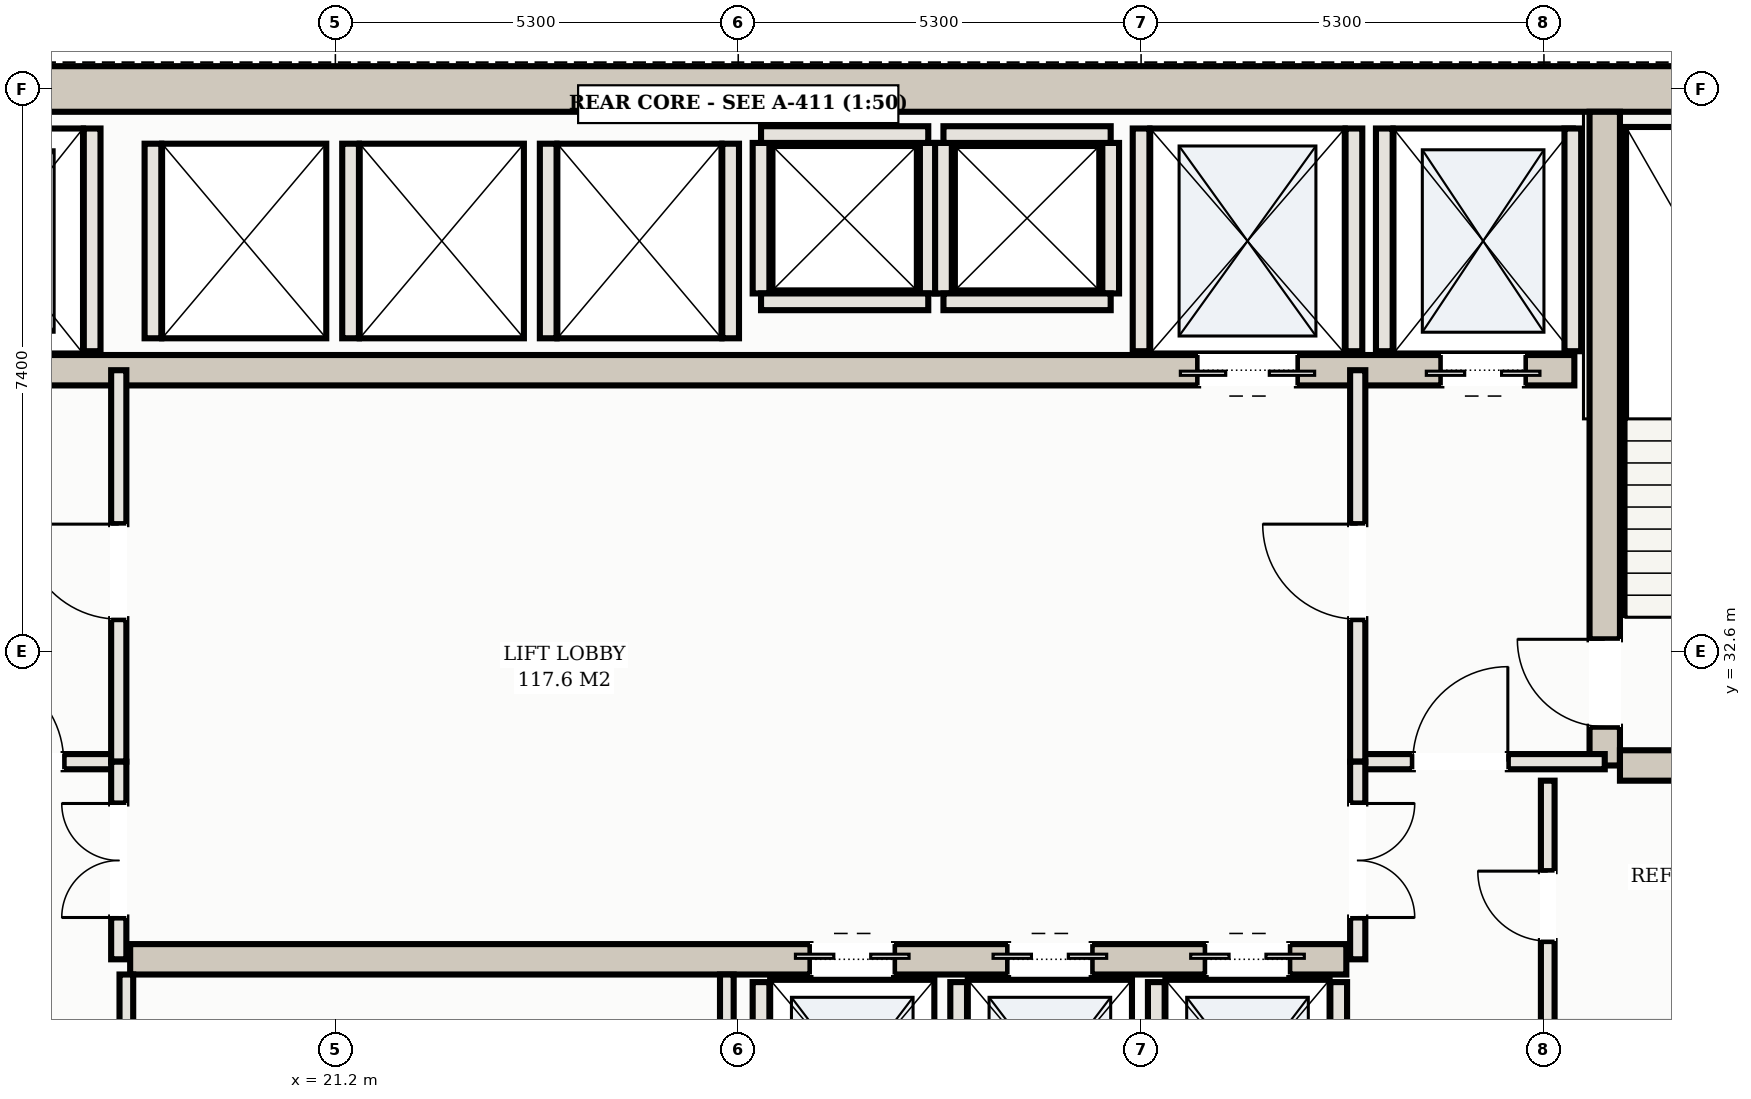
"""IFC4 building model, lengths in metres.
Left out: names, types, materials, properties, quantities, classifications, styles, units other than length and angle.
Written with IfcOpenShell. Run it as: python <this file> out.ifc"""

import sys

from ifc_helpers import new_model, si_unit, direction, frame, frame_2d, origin, place, context, subcontext, project, spatial, rectangle, extrude, element, fill, save


model = new_model("IFC4")
c1 = context("Model", 3, precision=1e-05, world=origin(), true_north=direction((0.0, 1.0)))
c2 = subcontext(c1, "Body", "Model", "MODEL_VIEW")
j1 = project(units=[si_unit("LENGTHUNIT", "METRE"), si_unit("PLANEANGLEUNIT", "RADIAN")], contexts=[c1])
p1 = place(None, origin())
s1 = spatial("IfcSite", under=j1, at=p1, CompositionType="ELEMENT")
p2 = place(p1, origin())
s2 = spatial("IfcBuilding", under=s1, at=p2, CompositionType="ELEMENT")
p3 = place(p2, frame((0.0, 0.0, 178.8)))
s3 = spatial("IfcBuildingStorey", under=s2, at=p3, CompositionType="ELEMENT", Elevation=178.8)
p4 = place(p3, frame((10.3, 40.0, 0.0), z_axis=(0.0, 0.0, 1.0), x_axis=(1.0, 0.0, 0.0)))
e1 = element("IfcWall", 1, at=p4, inside=s3, PredefinedType="SHEAR", context=c2, shape_type="SweptSolid", body=[
    extrude(rectangle(XDim=32.4, YDim=0.6, at=frame_2d((16.2, 0.0))), origin(), (0.0, 0.0, 1.0), 3.1),
])
p5 = place(p3, frame((37.9, 31.1, 0.0), z_axis=(0.0, 0.0, 1.0), x_axis=(0.0, 1.0, 0.0)))
e2 = element("IfcWall", 2, at=p5, inside=s3, PredefinedType="SHEAR", context=c2, shape_type="SweptSolid", body=[
    extrude(rectangle(XDim=8.6, YDim=0.4, at=frame_2d((4.3, 0.0))), origin(), (0.0, 0.0, 1.0), 3.1),
])
p6 = place(p5, frame((0.51, 0.0, 0.0)))
e3 = element("IfcOpeningElement", 3, at=p6, cuts=e2, PredefinedType="OPENING", context=c2, shape_type="SweptSolid", body=[
    extrude(rectangle(XDim=1.15, YDim=2.2, at=frame_2d((0.575, 1.1))), frame((0.0, 0.21, 0.0), z_axis=(0.0, -1.0, 0.0), x_axis=(1.0, 0.0, 0.0)), (0.0, 0.0, 1.0), 0.42),
])
p7 = place(p3, frame((38.1, 31.1, 0.0), z_axis=(0.0, 0.0, 1.0), x_axis=(1.0, 0.0, 0.0)))
e4 = element("IfcWall", 4, at=p7, inside=s3, PredefinedType="SHEAR", context=c2, shape_type="SweptSolid", body=[
    extrude(rectangle(XDim=4.0, YDim=0.4, at=frame_2d((2.0, 0.0))), origin(), (0.0, 0.0, 1.0), 3.1),
])
p8 = place(p3, frame((15.5, 36.3, 0.0), z_axis=(0.0, 0.0, 1.0), x_axis=(1.0, 0.0, 0.0)))
e5 = element("IfcWall", 5, at=p8, inside=s3, PredefinedType="SHEAR", context=c2, shape_type="SweptSolid", body=[
    extrude(rectangle(XDim=22.0, YDim=0.4, at=frame_2d((11.0, 0.0))), origin(), (0.0, 0.0, 1.0), 3.1),
])
p9 = place(p8, frame((0.65, 0.0, 0.0)))
e6 = element("IfcOpeningElement", 6, at=p9, cuts=e5, PredefinedType="OPENING", context=c2, shape_type="SweptSolid", body=[
    extrude(rectangle(XDim=1.1, YDim=2.15, at=frame_2d((0.55, 1.075))), frame((0.0, 0.21, 0.0), z_axis=(0.0, -1.0, 0.0), x_axis=(1.0, 0.0, 0.0)), (0.0, 0.0, 1.0), 0.42),
])
p10 = place(p8, frame((20.25, 0.0, 0.0)))
e7 = element("IfcOpeningElement", 7, at=p10, cuts=e5, PredefinedType="OPENING", context=c2, shape_type="SweptSolid", body=[
    extrude(rectangle(XDim=1.1, YDim=2.15, at=frame_2d((0.55, 1.075))), frame((0.0, 0.21, 0.0), z_axis=(0.0, -1.0, 0.0), x_axis=(1.0, 0.0, 0.0)), (0.0, 0.0, 1.0), 0.42),
])
p11 = place(p8, frame((17.05, 0.0, 0.0)))
e8 = element("IfcOpeningElement", 8, at=p11, cuts=e5, PredefinedType="OPENING", context=c2, shape_type="SweptSolid", body=[
    extrude(rectangle(XDim=1.3, YDim=2.2, at=frame_2d((0.65, 1.1))), frame((0.0, 0.21, 0.0), z_axis=(0.0, -1.0, 0.0), x_axis=(1.0, 0.0, 0.0)), (0.0, 0.0, 1.0), 0.42),
])
p12 = place(p3, frame((18.5, 28.55, 0.0), z_axis=(0.0, 0.0, 1.0), x_axis=(1.0, 0.0, 0.0)))
e9 = element("IfcWall", 9, at=p12, inside=s3, PredefinedType="SHEAR", context=c2, shape_type="SweptSolid", body=[
    extrude(rectangle(XDim=16.0, YDim=0.4, at=frame_2d((8.0, 0.0))), origin(), (0.0, 0.0, 1.0), 3.1),
])
p13 = place(p12, frame((8.95, 0.0, 0.0)))
e10 = element("IfcOpeningElement", 10, at=p13, cuts=e9, PredefinedType="OPENING", context=c2, shape_type="SweptSolid", body=[
    extrude(rectangle(XDim=1.1, YDim=2.15, at=frame_2d((0.55, 1.075))), frame((0.0, 0.21, 0.0), z_axis=(0.0, -1.0, 0.0), x_axis=(1.0, 0.0, 0.0)), (0.0, 0.0, 1.0), 0.42),
])
p14 = place(p12, frame((11.55, 0.0, 0.0)))
e11 = element("IfcOpeningElement", 11, at=p14, cuts=e9, PredefinedType="OPENING", context=c2, shape_type="SweptSolid", body=[
    extrude(rectangle(XDim=1.1, YDim=2.15, at=frame_2d((0.55, 1.075))), frame((0.0, 0.21, 0.0), z_axis=(0.0, -1.0, 0.0), x_axis=(1.0, 0.0, 0.0)), (0.0, 0.0, 1.0), 0.42),
])
p15 = place(p12, frame((14.15, 0.0, 0.0)))
e12 = element("IfcOpeningElement", 12, at=p15, cuts=e9, PredefinedType="OPENING", context=c2, shape_type="SweptSolid", body=[
    extrude(rectangle(XDim=1.1, YDim=2.15, at=frame_2d((0.55, 1.075))), frame((0.0, 0.21, 0.0), z_axis=(0.0, -1.0, 0.0), x_axis=(1.0, 0.0, 0.0)), (0.0, 0.0, 1.0), 0.42),
])
for number, where, z_axis, x_axis in (
    (13, (18.0, 36.55, 0.0), (0.0, 0.0, 1.0), (0.0, 1.0, 0.0)),
    (14, (35.0, 36.55, 0.0), (0.0, 0.0, 1.0), (0.0, 1.0, 0.0)),
    (15, (37.48, 36.55, 0.0), (0.0, 0.0, 1.0), (0.0, 1.0, 0.0)),
    (16, (31.8, 36.55, 0.0), (0.0, 0.0, 1.0), (0.0, 1.0, 0.0)),
    (17, (34.6, 36.55, 0.0), (0.0, 0.0, 1.0), (0.0, 1.0, 0.0)),
):
    element("IfcWall", number, at=place(p3, frame(where, z_axis=z_axis, x_axis=x_axis)), inside=s3, PredefinedType="SOLIDWALL", context=c2, shape_type="SweptSolid", body=[
        extrude(rectangle(XDim=2.93, YDim=0.22, at=frame_2d((1.465, 0.0))), origin(), (0.0, 0.0, 1.0), 3.1),
    ])
for number, where, z_axis, x_axis in (
    (18, (26.8, 25.72, 0.0), (0.0, 0.0, 1.0), (0.0, 1.0, 0.0)),
    (19, (29.4, 25.72, 0.0), (0.0, 0.0, 1.0), (0.0, 1.0, 0.0)),
    (20, (32.0, 25.72, 0.0), (0.0, 0.0, 1.0), (0.0, 1.0, 0.0)),
    (21, (34.4, 25.72, 0.0), (0.0, 0.0, 1.0), (0.0, 1.0, 0.0)),
):
    element("IfcWall", number, at=place(p3, frame(where, z_axis=z_axis, x_axis=x_axis)), inside=s3, PredefinedType="SOLIDWALL", context=c2, shape_type="SweptSolid", body=[
        extrude(rectangle(XDim=2.53, YDim=0.22, at=frame_2d((1.265, 0.0))), origin(), (0.0, 0.0, 1.0), 3.1),
    ])
for number, where, z_axis, x_axis in (
    (22, (18.8, 36.72, 0.0), (0.0, 0.0, 1.0), (0.0, 1.0, 0.0)),
    (23, (21.4, 36.72, 0.0), (0.0, 0.0, 1.0), (0.0, 1.0, 0.0)),
    (24, (24.0, 36.72, 0.0), (0.0, 0.0, 1.0), (0.0, 1.0, 0.0)),
    (25, (26.4, 36.72, 0.0), (0.0, 0.0, 1.0), (0.0, 1.0, 0.0)),
):
    element("IfcWall", number, at=place(p3, frame(where, z_axis=z_axis, x_axis=x_axis)), inside=s3, PredefinedType="SOLIDWALL", context=c2, shape_type="SweptSolid", body=[
        extrude(rectangle(XDim=2.56, YDim=0.22, at=frame_2d((1.28, 0.0))), origin(), (0.0, 0.0, 1.0), 3.1),
    ])
for number, where, z_axis, x_axis in (
    (26, (26.8, 37.31, 0.0), (0.0, 0.0, 1.0), (0.0, 1.0, 0.0)),
    (27, (29.0, 37.31, 0.0), (0.0, 0.0, 1.0), (0.0, 1.0, 0.0)),
):
    element("IfcWall", number, at=place(p3, frame(where, z_axis=z_axis, x_axis=x_axis)), inside=s3, PredefinedType="SOLIDWALL", context=c2, shape_type="SweptSolid", body=[
        extrude(rectangle(XDim=1.98, YDim=0.22, at=frame_2d((0.99, 0.0))), origin(), (0.0, 0.0, 1.0), 3.1),
    ])
for number, where, z_axis, x_axis in (
    (28, (26.8, 39.4, 0.0), (0.0, 0.0, 1.0), (1.0, 0.0, 0.0)),
    (29, (26.8, 37.2, 0.0), (0.0, 0.0, 1.0), (1.0, 0.0, 0.0)),
):
    element("IfcWall", number, at=place(p3, frame(where, z_axis=z_axis, x_axis=x_axis)), inside=s3, PredefinedType="SOLIDWALL", context=c2, shape_type="SweptSolid", body=[
        extrude(rectangle(XDim=2.2, YDim=0.22, at=frame_2d((1.1, 0.0))), origin(), (0.0, 0.0, 1.0), 3.1),
    ])
for number, where, z_axis, x_axis in (
    (30, (29.2, 37.31, 0.0), (0.0, 0.0, 1.0), (0.0, 1.0, 0.0)),
    (31, (31.4, 37.31, 0.0), (0.0, 0.0, 1.0), (0.0, 1.0, 0.0)),
):
    element("IfcWall", number, at=place(p3, frame(where, z_axis=z_axis, x_axis=x_axis)), inside=s3, PredefinedType="SOLIDWALL", context=c2, shape_type="SweptSolid", body=[
        extrude(rectangle(XDim=1.98, YDim=0.22, at=frame_2d((0.99, 0.0))), origin(), (0.0, 0.0, 1.0), 3.1),
    ])
for number, where, z_axis, x_axis in (
    (32, (29.2, 39.4, 0.0), (0.0, 0.0, 1.0), (1.0, 0.0, 0.0)),
    (33, (29.2, 37.2, 0.0), (0.0, 0.0, 1.0), (1.0, 0.0, 0.0)),
):
    element("IfcWall", number, at=place(p3, frame(where, z_axis=z_axis, x_axis=x_axis)), inside=s3, PredefinedType="SOLIDWALL", context=c2, shape_type="SweptSolid", body=[
        extrude(rectangle(XDim=2.2, YDim=0.22, at=frame_2d((1.1, 0.0))), origin(), (0.0, 0.0, 1.0), 3.1),
    ])
p16 = place(p3, frame((15.1, 31.15, 0.0), z_axis=(0.0, 0.0, 1.0), x_axis=(1.0, 0.0, 0.0)))
e34 = element("IfcWall", 34, at=p16, inside=s3, PredefinedType="PARTITIONING", context=c2, shape_type="SweptSolid", body=[
    extrude(rectangle(XDim=3.25, YDim=0.2, at=frame_2d((1.625, 0.0))), origin(), (0.0, 0.0, 1.0), 2.38),
])
p17 = place(p16, frame((1.275, 0.0, 0.0)))
e35 = element("IfcOpeningElement", 35, at=p17, cuts=e34, PredefinedType="OPENING", context=c2, shape_type="SweptSolid", body=[
    extrude(rectangle(XDim=1.25, YDim=2.2, at=frame_2d((0.625, 1.1))), frame((0.0, 0.11, 0.0), z_axis=(0.0, -1.0, 0.0), x_axis=(1.0, 0.0, 0.0)), (0.0, 0.0, 1.0), 0.22),
])
p18 = place(p3, frame((18.35, 31.15, 0.0), z_axis=(0.0, 0.0, 1.0), x_axis=(0.0, 1.0, 0.0)))
e36 = element("IfcWall", 36, at=p18, inside=s3, PredefinedType="PARTITIONING", context=c2, shape_type="SweptSolid", body=[
    extrude(rectangle(XDim=5.15, YDim=0.2, at=frame_2d((2.575, 0.0))), origin(), (0.0, 0.0, 1.0), 2.38),
])
p19 = place(p18, frame((1.875, 0.0, 0.0)))
e37 = element("IfcOpeningElement", 37, at=p19, cuts=e36, PredefinedType="OPENING", context=c2, shape_type="SweptSolid", body=[
    extrude(rectangle(XDim=1.25, YDim=2.2, at=frame_2d((0.625, 1.1))), frame((0.0, 0.11, 0.0), z_axis=(0.0, -1.0, 0.0), x_axis=(1.0, 0.0, 0.0)), (0.0, 0.0, 1.0), 0.22),
])
p20 = place(p3, frame((34.65, 31.15, 0.0), z_axis=(0.0, 0.0, 1.0), x_axis=(1.0, 0.0, 0.0)))
e38 = element("IfcWall", 38, at=p20, inside=s3, PredefinedType="PARTITIONING", context=c2, shape_type="SweptSolid", body=[
    extrude(rectangle(XDim=3.25, YDim=0.2, at=frame_2d((1.625, 0.0))), origin(), (0.0, 0.0, 1.0), 2.38),
])
p21 = place(p20, frame((0.725, 0.0, 0.0)))
e39 = element("IfcOpeningElement", 39, at=p21, cuts=e38, PredefinedType="OPENING", context=c2, shape_type="SweptSolid", body=[
    extrude(rectangle(XDim=1.25, YDim=2.2, at=frame_2d((0.625, 1.1))), frame((0.0, 0.11, 0.0), z_axis=(0.0, -1.0, 0.0), x_axis=(1.0, 0.0, 0.0)), (0.0, 0.0, 1.0), 0.22),
])
p22 = place(p3, frame((34.65, 31.15, 0.0), z_axis=(0.0, 0.0, 1.0), x_axis=(0.0, 1.0, 0.0)))
e40 = element("IfcWall", 40, at=p22, inside=s3, PredefinedType="PARTITIONING", context=c2, shape_type="SweptSolid", body=[
    extrude(rectangle(XDim=5.15, YDim=0.2, at=frame_2d((2.575, 0.0))), origin(), (0.0, 0.0, 1.0), 2.38),
])
p23 = place(p22, frame((1.875, 0.0, 0.0)))
e41 = element("IfcOpeningElement", 41, at=p23, cuts=e40, PredefinedType="OPENING", context=c2, shape_type="SweptSolid", body=[
    extrude(rectangle(XDim=1.25, YDim=2.2, at=frame_2d((0.625, 1.1))), frame((0.0, 0.11, 0.0), z_axis=(0.0, -1.0, 0.0), x_axis=(1.0, 0.0, 0.0)), (0.0, 0.0, 1.0), 0.22),
])
p24 = place(p3, frame((37.15, 25.5, 0.0), z_axis=(0.0, 0.0, 1.0), x_axis=(0.0, 1.0, 0.0)))
e42 = element("IfcWall", 42, at=p24, inside=s3, PredefinedType="PARTITIONING", context=c2, shape_type="SweptSolid", body=[
    extrude(rectangle(XDim=5.4, YDim=0.18, at=frame_2d((2.7, 0.0))), origin(), (0.0, 0.0, 1.0), 2.38),
])
p25 = place(p24, frame((0.65, 0.0, 0.0)))
e43 = element("IfcOpeningElement", 43, at=p25, cuts=e42, PredefinedType="OPENING", context=c2, shape_type="SweptSolid", body=[
    extrude(rectangle(XDim=0.9, YDim=2.15, at=frame_2d((0.45, 1.075))), frame((0.0, 0.1, 0.0), z_axis=(0.0, -1.0, 0.0), x_axis=(1.0, 0.0, 0.0)), (0.0, 0.0, 1.0), 0.2),
])
p26 = place(p24, frame((3.29, 0.0, 0.0)))
e44 = element("IfcOpeningElement", 44, at=p26, cuts=e42, PredefinedType="OPENING", context=c2, shape_type="SweptSolid", body=[
    extrude(rectangle(XDim=0.92, YDim=2.15, at=frame_2d((0.46, 1.075))), frame((0.0, 0.1, 0.0), z_axis=(0.0, -1.0, 0.0), x_axis=(1.0, 0.0, 0.0)), (0.0, 0.0, 1.0), 0.2),
])
p27 = place(p3, frame((18.35, 28.55, 0.0), z_axis=(0.0, 0.0, 1.0), x_axis=(0.0, 1.0, 0.0)))
e45 = element("IfcWall", 45, at=p27, inside=s3, PredefinedType="PARTITIONING", context=c2, shape_type="SweptSolid", body=[
    extrude(rectangle(XDim=2.6, YDim=0.2, at=frame_2d((1.3, 0.0))), origin(), (0.0, 0.0, 1.0), 2.38),
])
p28 = place(p27, frame((0.55, 0.0, 0.0)))
e46 = element("IfcOpeningElement", 46, at=p28, cuts=e45, PredefinedType="OPENING", context=c2, shape_type="SweptSolid", body=[
    extrude(rectangle(XDim=1.5, YDim=2.25, at=frame_2d((0.75, 1.125))), frame((0.0, 0.11, 0.0), z_axis=(0.0, -1.0, 0.0), x_axis=(1.0, 0.0, 0.0)), (0.0, 0.0, 1.0), 0.22),
])
p29 = place(p3, frame((34.65, 28.55, 0.0), z_axis=(0.0, 0.0, 1.0), x_axis=(0.0, 1.0, 0.0)))
e47 = element("IfcWall", 47, at=p29, inside=s3, PredefinedType="PARTITIONING", context=c2, shape_type="SweptSolid", body=[
    extrude(rectangle(XDim=2.6, YDim=0.2, at=frame_2d((1.3, 0.0))), origin(), (0.0, 0.0, 1.0), 2.38),
])
p30 = place(p29, frame((0.55, 0.0, 0.0)))
e48 = element("IfcOpeningElement", 48, at=p30, cuts=e47, PredefinedType="OPENING", context=c2, shape_type="SweptSolid", body=[
    extrude(rectangle(XDim=1.5, YDim=2.25, at=frame_2d((0.75, 1.125))), frame((0.0, 0.11, 0.0), z_axis=(0.0, -1.0, 0.0), x_axis=(1.0, 0.0, 0.0)), (0.0, 0.0, 1.0), 0.22),
])
for number, where, z_axis, x_axis in (
    (49, (18.45, 25.62, 0.0), (0.0, 0.0, 1.0), (0.0, 1.0, 0.0)),
    (50, (26.35, 25.62, 0.0), (0.0, 0.0, 1.0), (0.0, 1.0, 0.0)),
):
    element("IfcWall", number, at=place(p3, frame(where, z_axis=z_axis, x_axis=x_axis)), inside=s3, PredefinedType="PARTITIONING", context=c2, shape_type="SweptSolid", body=[
        extrude(rectangle(XDim=2.73, YDim=0.18, at=frame_2d((1.365, 0.0))), origin(), (0.0, 0.0, 1.0), 2.38),
    ])
p31 = place(p10, frame((1.1, 0.0, 0.0), z_axis=(0.0, 0.0, 1.0), x_axis=(-1.0, 0.0, 0.0)))
e51 = element("IfcDoor", 51, at=p31, inside=s3, OperationType="DOUBLE_DOOR_SLIDING", PredefinedType="DOOR", context=c2, shape_type="SweptSolid", body=[
    extrude(rectangle(XDim=1.1, YDim=2.15, at=frame_2d((0.55, 1.075))), frame((0.0, 0.025, 0.0), z_axis=(0.0, -1.0, 0.0), x_axis=(1.0, 0.0, 0.0)), (0.0, 0.0, 1.0), 0.05),
])
fill(e7, e51)
p32 = place(p11, frame((1.3, 0.0, 0.0), z_axis=(0.0, 0.0, 1.0), x_axis=(-1.0, 0.0, 0.0)))
e52 = element("IfcDoor", 52, at=p32, inside=s3, OperationType="DOUBLE_DOOR_SLIDING", PredefinedType="DOOR", context=c2, shape_type="SweptSolid", body=[
    extrude(rectangle(XDim=1.3, YDim=2.2, at=frame_2d((0.65, 1.1))), frame((0.0, 0.025, 0.0), z_axis=(0.0, -1.0, 0.0), x_axis=(1.0, 0.0, 0.0)), (0.0, 0.0, 1.0), 0.05),
])
fill(e8, e52)
p33 = place(p13, origin())
e53 = element("IfcDoor", 53, at=p33, inside=s3, OperationType="DOUBLE_DOOR_SLIDING", PredefinedType="DOOR", context=c2, shape_type="SweptSolid", body=[
    extrude(rectangle(XDim=1.1, YDim=2.15, at=frame_2d((0.55, 1.075))), frame((0.0, 0.025, 0.0), z_axis=(0.0, -1.0, 0.0), x_axis=(1.0, 0.0, 0.0)), (0.0, 0.0, 1.0), 0.05),
])
fill(e10, e53)
p34 = place(p14, origin())
e54 = element("IfcDoor", 54, at=p34, inside=s3, OperationType="DOUBLE_DOOR_SLIDING", PredefinedType="DOOR", context=c2, shape_type="SweptSolid", body=[
    extrude(rectangle(XDim=1.1, YDim=2.15, at=frame_2d((0.55, 1.075))), frame((0.0, 0.025, 0.0), z_axis=(0.0, -1.0, 0.0), x_axis=(1.0, 0.0, 0.0)), (0.0, 0.0, 1.0), 0.05),
])
fill(e11, e54)
p35 = place(p15, origin())
e55 = element("IfcDoor", 55, at=p35, inside=s3, OperationType="DOUBLE_DOOR_SLIDING", PredefinedType="DOOR", context=c2, shape_type="SweptSolid", body=[
    extrude(rectangle(XDim=1.1, YDim=2.15, at=frame_2d((0.55, 1.075))), frame((0.0, 0.025, 0.0), z_axis=(0.0, -1.0, 0.0), x_axis=(1.0, 0.0, 0.0)), (0.0, 0.0, 1.0), 0.05),
])
fill(e12, e55)
p36 = place(p17, origin())
e56 = element("IfcDoor", 56, at=p36, inside=s3, OperationType="SINGLE_SWING_LEFT", PredefinedType="DOOR", context=c2, shape_type="SweptSolid", body=[
    extrude(rectangle(XDim=1.25, YDim=2.2, at=frame_2d((0.625, 1.1))), frame((0.0, 0.025, 0.0), z_axis=(0.0, -1.0, 0.0), x_axis=(1.0, 0.0, 0.0)), (0.0, 0.0, 1.0), 0.05),
])
fill(e35, e56)
p37 = place(p19, origin())
e57 = element("IfcDoor", 57, at=p37, inside=s3, OperationType="SINGLE_SWING_RIGHT", PredefinedType="DOOR", context=c2, shape_type="SweptSolid", body=[
    extrude(rectangle(XDim=1.25, YDim=2.2, at=frame_2d((0.625, 1.1))), frame((0.0, 0.025, 0.0), z_axis=(0.0, -1.0, 0.0), x_axis=(1.0, 0.0, 0.0)), (0.0, 0.0, 1.0), 0.05),
])
fill(e37, e57)
p38 = place(p21, origin())
e58 = element("IfcDoor", 58, at=p38, inside=s3, OperationType="SINGLE_SWING_RIGHT", PredefinedType="DOOR", context=c2, shape_type="SweptSolid", body=[
    extrude(rectangle(XDim=1.25, YDim=2.2, at=frame_2d((0.625, 1.1))), frame((0.0, 0.025, 0.0), z_axis=(0.0, -1.0, 0.0), x_axis=(1.0, 0.0, 0.0)), (0.0, 0.0, 1.0), 0.05),
])
fill(e39, e58)
p39 = place(p23, origin())
e59 = element("IfcDoor", 59, at=p39, inside=s3, OperationType="SINGLE_SWING_RIGHT", PredefinedType="DOOR", context=c2, shape_type="SweptSolid", body=[
    extrude(rectangle(XDim=1.25, YDim=2.2, at=frame_2d((0.625, 1.1))), frame((0.0, 0.025, 0.0), z_axis=(0.0, -1.0, 0.0), x_axis=(1.0, 0.0, 0.0)), (0.0, 0.0, 1.0), 0.05),
])
fill(e41, e59)
p40 = place(p6, origin())
e60 = element("IfcDoor", 60, at=p40, inside=s3, OperationType="SINGLE_SWING_RIGHT", PredefinedType="DOOR", context=c2, shape_type="SweptSolid", body=[
    extrude(rectangle(XDim=1.15, YDim=2.2, at=frame_2d((0.575, 1.1))), frame((0.0, 0.025, 0.0), z_axis=(0.0, -1.0, 0.0), x_axis=(1.0, 0.0, 0.0)), (0.0, 0.0, 1.0), 0.05),
])
fill(e3, e60)
p41 = place(p26, origin())
e61 = element("IfcDoor", 61, at=p41, inside=s3, OperationType="SINGLE_SWING_RIGHT", PredefinedType="DOOR", context=c2, shape_type="SweptSolid", body=[
    extrude(rectangle(XDim=0.92, YDim=2.15, at=frame_2d((0.46, 1.075))), frame((0.0, 0.025, 0.0), z_axis=(0.0, -1.0, 0.0), x_axis=(1.0, 0.0, 0.0)), (0.0, 0.0, 1.0), 0.05),
])
fill(e44, e61)
p42 = place(p28, origin())
e62 = element("IfcDoor", 62, at=p42, inside=s3, OperationType="DOUBLE_DOOR_SINGLE_SWING", PredefinedType="DOOR", context=c2, shape_type="SweptSolid", body=[
    extrude(rectangle(XDim=1.5, YDim=2.25, at=frame_2d((0.75, 1.125))), frame((0.0, 0.025, 0.0), z_axis=(0.0, -1.0, 0.0), x_axis=(1.0, 0.0, 0.0)), (0.0, 0.0, 1.0), 0.05),
])
fill(e46, e62)
p43 = place(p30, frame((1.5, 0.0, 0.0), z_axis=(0.0, 0.0, 1.0), x_axis=(-1.0, 0.0, 0.0)))
e63 = element("IfcDoor", 63, at=p43, inside=s3, OperationType="DOUBLE_DOOR_SINGLE_SWING", PredefinedType="DOOR", context=c2, shape_type="SweptSolid", body=[
    extrude(rectangle(XDim=1.5, YDim=2.25, at=frame_2d((0.75, 1.125))), frame((0.0, 0.025, 0.0), z_axis=(0.0, -1.0, 0.0), x_axis=(1.0, 0.0, 0.0)), (0.0, 0.0, 1.0), 0.05),
])
fill(e48, e63)
save(model, sys.argv[1])
